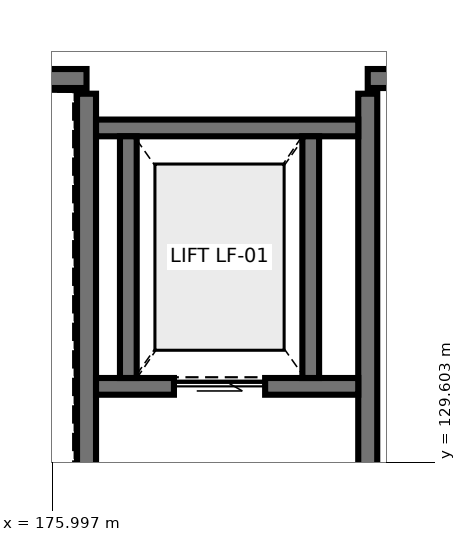
"""IFC4 building model, lengths in metres.
Left out: names, types, materials, properties, quantities, classifications, styles, units other than length and angle.
Written with IfcOpenShell. Run it as: python <this file> out.ifc"""

import sys

from ifc_helpers import new_model, si_unit, direction, frame, frame_2d, origin, place, context, subcontext, project, spatial, rectangle, extrude, element, fill, save


model = new_model("IFC4")
c1 = context("Model", 3, precision=1e-05, world=origin(), true_north=direction((0.0, 1.0)))
c2 = subcontext(c1, "Body", "Model", "MODEL_VIEW")
j1 = project(units=[si_unit("LENGTHUNIT", "METRE"), si_unit("PLANEANGLEUNIT", "RADIAN")], contexts=[c1])
p1 = place(None, origin())
s1 = spatial("IfcSite", under=j1, at=p1, CompositionType="ELEMENT")
p2 = place(p1, origin())
s2 = spatial("IfcBuilding", under=s1, at=p2, CompositionType="ELEMENT")
p3 = place(p2, frame((0.0, 0.0, 19.5)))
s3 = spatial("IfcBuildingStorey", under=s2, at=p3, CompositionType="ELEMENT", Elevation=19.5)
p4 = place(p3, frame((168.15, 134.65, 0.0), z_axis=(0.0, 0.0, 1.0), x_axis=(1.0, 0.0, 0.0)))
e1 = element("IfcWall", 1, at=p4, inside=s3, PredefinedType="SHEAR", context=c2, shape_type="SweptSolid", body=[
    extrude(rectangle(XDim=8.3, YDim=0.25, at=frame_2d((4.15, 0.0))), origin(), (0.0, 0.0, 1.0), 3.94),
])
p5 = place(p3, frame((176.45, 134.45, 0.0), z_axis=(0.0, 0.0, 1.0), x_axis=(0.0, -1.0, 0.0)))
e2 = element("IfcWall", 2, at=p5, inside=s3, PredefinedType="SHEAR", context=c2, shape_type="SweptSolid", body=[
    extrude(rectangle(XDim=5.3, YDim=0.25, at=frame_2d((2.65, 0.0))), origin(), (0.0, 0.0, 1.0), 3.94),
])
p6 = place(p3, frame((180.15, 134.65, 0.0), z_axis=(0.0, 0.0, 1.0), x_axis=(1.0, 0.0, 0.0)))
e3 = element("IfcWall", 3, at=p6, inside=s3, PredefinedType="SHEAR", context=c2, shape_type="SweptSolid", body=[
    extrude(rectangle(XDim=8.3, YDim=0.25, at=frame_2d((4.15, 0.0))), origin(), (0.0, 0.0, 1.0), 3.94),
])
p7 = place(p3, frame((180.15, 129.15, 0.0), z_axis=(0.0, 0.0, 1.0), x_axis=(0.0, 1.0, 0.0)))
e4 = element("IfcWall", 4, at=p7, inside=s3, PredefinedType="SHEAR", context=c2, shape_type="SweptSolid", body=[
    extrude(rectangle(XDim=5.3, YDim=0.25, at=frame_2d((2.65, 0.0))), origin(), (0.0, 0.0, 1.0), 3.94),
])
p8 = place(p3, frame((176.575, 130.6, 0.0), z_axis=(0.0, 0.0, 1.0), x_axis=(1.0, 0.0, 0.0)))
e5 = element("IfcWall", 5, at=p8, inside=s3, PredefinedType="SHEAR", context=c2, shape_type="SweptSolid", body=[
    extrude(rectangle(XDim=3.45, YDim=0.22, at=frame_2d((1.725, 0.0))), origin(), (0.0, 0.0, 1.0), 3.94),
])
p9 = place(p8, frame((1.025, 0.0, 0.0)))
e6 = element("IfcOpeningElement", 6, at=p9, cuts=e5, PredefinedType="OPENING", context=c2, shape_type="SweptSolid", body=[
    extrude(rectangle(XDim=1.2, YDim=2.25, at=frame_2d((0.6, 1.125))), frame((0.0, 0.12, 0.0), z_axis=(0.0, -1.0, 0.0), x_axis=(1.0, 0.0, 0.0)), (0.0, 0.0, 1.0), 0.24),
])
p10 = place(p3, frame((176.575, 134.0, 0.0), z_axis=(0.0, 0.0, 1.0), x_axis=(1.0, 0.0, 0.0)))
e7 = element("IfcWall", 7, at=p10, inside=s3, PredefinedType="SHEAR", context=c2, shape_type="SweptSolid", body=[
    extrude(rectangle(XDim=3.45, YDim=0.22, at=frame_2d((1.725, 0.0))), origin(), (0.0, 0.0, 1.0), 3.94),
])
for number, where, z_axis, x_axis in (
    (8, (177.0, 130.71, 0.0), (0.0, 0.0, 1.0), (0.0, 1.0, 0.0)),
    (9, (179.4, 130.71, 0.0), (0.0, 0.0, 1.0), (0.0, 1.0, 0.0)),
):
    element("IfcWall", number, at=place(p3, frame(where, z_axis=z_axis, x_axis=x_axis)), inside=s3, PredefinedType="SHEAR", context=c2, shape_type="SweptSolid", body=[
        extrude(rectangle(XDim=3.18, YDim=0.22, at=frame_2d((1.59, 0.0))), origin(), (0.0, 0.0, 1.0), 3.94),
    ])
p11 = place(p9, origin())
e10 = element("IfcDoor", 10, at=p11, inside=s3, OperationType="SLIDING_TO_LEFT", PredefinedType="DOOR", context=c2, shape_type="SweptSolid", body=[
    extrude(rectangle(XDim=1.2, YDim=2.25, at=frame_2d((0.6, 1.125))), frame((0.0, 0.025, 0.0), z_axis=(0.0, -1.0, 0.0), x_axis=(1.0, 0.0, 0.0)), (0.0, 0.0, 1.0), 0.05),
])
fill(e6, e10)
save(model, sys.argv[1])
